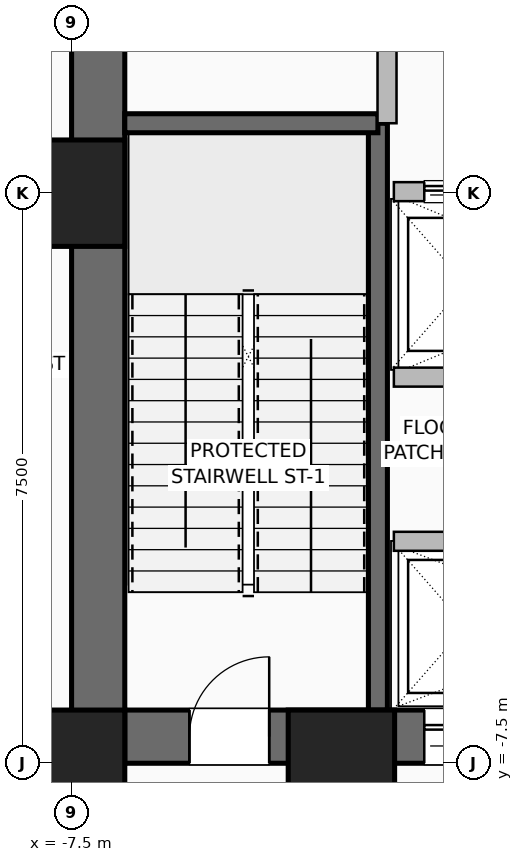
"""IFC4 building model, lengths in metres.
Left out: names, types, materials, properties, quantities, classifications, styles, units other than length and angle.
Written with IfcOpenShell. Run it as: python <this file> out.ifc"""

import sys

from ifc_helpers import new_model, si_unit, direction, frame, frame_2d, origin, origin_2d, place, context, subcontext, project, spatial, rectangle, hollow_rectangle, extrude, element, fill, save


model = new_model("IFC4")
c1 = context("Model", 3, precision=1e-05, world=origin(), true_north=direction((0.0, 1.0)))
c2 = subcontext(c1, "Body", "Model", "MODEL_VIEW")
j1 = project(units=[si_unit("LENGTHUNIT", "METRE"), si_unit("PLANEANGLEUNIT", "RADIAN")], contexts=[c1])
p1 = place(None, origin())
s1 = spatial("IfcSite", under=j1, at=p1, CompositionType="ELEMENT")
p2 = place(p1, origin())
s2 = spatial("IfcBuilding", under=s1, at=p2, CompositionType="ELEMENT")
p3 = place(p2, frame((0.0, 0.0, 16.2)))
s3 = spatial("IfcBuildingStorey", under=s2, at=p3, CompositionType="ELEMENT", Elevation=16.2)
for number, where, z_axis, x_axis in (
    (1, (-7.5, -7.5, 0.0), (0.0, 0.0, 1.0), (1.0, 0.0, 0.0)),
    (2, (-3.95, -7.5, 0.0), (0.0, 0.0, 1.0), (1.0, 0.0, 0.0)),
    (3, (-7.5, 0.0, 0.0), (0.0, 0.0, 1.0), (1.0, 0.0, 0.0)),
):
    element("IfcColumn", number, at=place(p3, frame(where, z_axis=z_axis, x_axis=x_axis)), inside=s3, PredefinedType="COLUMN", context=c2, shape_type="SweptSolid", body=[
        extrude(hollow_rectangle(XDim=1.4, YDim=1.4, WallThickness=0.06, at=origin_2d()), origin(), (0.0, 0.0, 1.0), 5.4),
    ])
p4 = place(p3, frame((-7.5, -7.15, 0.0), z_axis=(0.0, 0.0, 1.0), x_axis=(1.0, 0.0, 0.0)))
e4 = element("IfcWall", 4, at=p4, inside=s3, PredefinedType="SHEAR", context=c2, shape_type="SweptSolid", body=[
    extrude(rectangle(XDim=15.0, YDim=0.7, at=frame_2d((7.5, 0.0))), origin(), (0.0, 0.0, 1.0), 5.0),
])
p5 = place(p4, frame((1.55, 0.0, 0.0)))
e5 = element("IfcOpeningElement", 5, at=p5, cuts=e4, PredefinedType="OPENING", context=c2, shape_type="SweptSolid", body=[
    extrude(rectangle(XDim=1.05, YDim=2.08, at=frame_2d((0.525, 1.04))), frame((0.0, 0.36, 0.0), z_axis=(0.0, -1.0, 0.0), x_axis=(1.0, 0.0, 0.0)), (0.0, 0.0, 1.0), 0.72),
])
p6 = place(p4, frame((12.4, 0.0, 0.0)))
e6 = element("IfcOpeningElement", 6, at=p6, cuts=e4, PredefinedType="OPENING", context=c2, shape_type="SweptSolid", body=[
    extrude(rectangle(XDim=1.05, YDim=2.08, at=frame_2d((0.525, 1.04))), frame((0.0, 0.36, 0.0), z_axis=(0.0, -1.0, 0.0), x_axis=(1.0, 0.0, 0.0)), (0.0, 0.0, 1.0), 0.72),
])
p7 = place(p4, frame((4.64, 0.0, 0.0)))
e7 = element("IfcOpeningElement", 7, at=p7, cuts=e4, PredefinedType="OPENING", context=c2, shape_type="SweptSolid", body=[
    extrude(rectangle(XDim=1.1, YDim=2.2, at=frame_2d((0.55, 1.1))), frame((0.0, 0.36, 0.0), z_axis=(0.0, -1.0, 0.0), x_axis=(1.0, 0.0, 0.0)), (0.0, 0.0, 1.0), 0.72),
])
p8 = place(p4, frame((6.52, 0.0, 0.0)))
e8 = element("IfcOpeningElement", 8, at=p8, cuts=e4, PredefinedType="OPENING", context=c2, shape_type="SweptSolid", body=[
    extrude(rectangle(XDim=1.1, YDim=2.2, at=frame_2d((0.55, 1.1))), frame((0.0, 0.36, 0.0), z_axis=(0.0, -1.0, 0.0), x_axis=(1.0, 0.0, 0.0)), (0.0, 0.0, 1.0), 0.72),
])
p9 = place(p4, frame((8.4, 0.0, 0.0)))
e9 = element("IfcOpeningElement", 9, at=p9, cuts=e4, PredefinedType="OPENING", context=c2, shape_type="SweptSolid", body=[
    extrude(rectangle(XDim=1.1, YDim=2.2, at=frame_2d((0.55, 1.1))), frame((0.0, 0.36, 0.0), z_axis=(0.0, -1.0, 0.0), x_axis=(1.0, 0.0, 0.0)), (0.0, 0.0, 1.0), 0.72),
])
p10 = place(p3, frame((-7.15, -7.5, 0.0), z_axis=(0.0, 0.0, 1.0), x_axis=(0.0, 1.0, 0.0)))
e10 = element("IfcWall", 10, at=p10, inside=s3, PredefinedType="SHEAR", context=c2, shape_type="SweptSolid", body=[
    extrude(rectangle(XDim=15.0, YDim=0.7, at=frame_2d((7.5, 0.0))), origin(), (0.0, 0.0, 1.0), 5.0),
])
p11 = place(p10, frame((9.5, 0.0, 0.0)))
e11 = element("IfcOpeningElement", 11, at=p11, cuts=e10, PredefinedType="OPENING", context=c2, shape_type="SweptSolid", body=[
    extrude(rectangle(XDim=1.0, YDim=2.08, at=frame_2d((0.5, 1.04))), frame((0.0, 0.36, 0.0), z_axis=(0.0, -1.0, 0.0), x_axis=(1.0, 0.0, 0.0)), (0.0, 0.0, 1.0), 0.72),
])
p12 = place(p3, frame((-3.47, -6.8, 0.0), z_axis=(0.0, 0.0, 1.0), x_axis=(0.0, 1.0, 0.0)))
e12 = element("IfcWall", 12, at=p12, inside=s3, PredefinedType="SHEAR", context=c2, shape_type="SweptSolid", body=[
    extrude(rectangle(XDim=7.72, YDim=0.25, at=frame_2d((3.86, 0.0))), origin(), (0.0, 0.0, 1.0), 5.0),
])
p13 = place(p3, frame((-6.8, 0.92, 0.0), z_axis=(0.0, 0.0, 1.0), x_axis=(1.0, 0.0, 0.0)))
e13 = element("IfcWall", 13, at=p13, inside=s3, PredefinedType="SHEAR", context=c2, shape_type="SweptSolid", body=[
    extrude(rectangle(XDim=3.33, YDim=0.25, at=frame_2d((1.665, 0.0))), origin(), (0.0, 0.0, 1.0), 5.0),
])
p14 = place(p3, frame((-3.26, -4.58, 0.0), z_axis=(0.0, 0.0, 1.0), x_axis=(1.0, 0.0, 0.0)))
e14 = element("IfcWall", 14, at=p14, inside=s3, PredefinedType="SHEAR", context=c2, shape_type="SweptSolid", body=[
    extrude(rectangle(XDim=5.64, YDim=0.25, at=frame_2d((2.82, 0.0))), origin(), (0.0, 0.0, 1.0), 5.0),
])
p15 = place(p3, frame((-3.26, 0.02, 0.0), z_axis=(0.0, 0.0, 1.0), x_axis=(1.0, 0.0, 0.0)))
e15 = element("IfcWall", 15, at=p15, inside=s3, PredefinedType="SHEAR", context=c2, shape_type="SweptSolid", body=[
    extrude(rectangle(XDim=5.64, YDim=0.25, at=frame_2d((2.82, 0.0))), origin(), (0.0, 0.0, 1.0), 5.0),
])
p16 = place(p15, frame((0.4, 0.0, 0.0)))
e16 = element("IfcOpeningElement", 16, at=p16, cuts=e15, PredefinedType="OPENING", context=c2, shape_type="SweptSolid", body=[
    extrude(rectangle(XDim=1.1, YDim=2.2, at=frame_2d((0.55, 1.1))), frame((0.0, 0.135, 0.0), z_axis=(0.0, -1.0, 0.0), x_axis=(1.0, 0.0, 0.0)), (0.0, 0.0, 1.0), 0.27),
])
p17 = place(p15, frame((2.28, 0.0, 0.0)))
e17 = element("IfcOpeningElement", 17, at=p17, cuts=e15, PredefinedType="OPENING", context=c2, shape_type="SweptSolid", body=[
    extrude(rectangle(XDim=1.1, YDim=2.2, at=frame_2d((0.55, 1.1))), frame((0.0, 0.135, 0.0), z_axis=(0.0, -1.0, 0.0), x_axis=(1.0, 0.0, 0.0)), (0.0, 0.0, 1.0), 0.27),
])
p18 = place(p15, frame((4.16, 0.0, 0.0)))
e18 = element("IfcOpeningElement", 18, at=p18, cuts=e15, PredefinedType="OPENING", context=c2, shape_type="SweptSolid", body=[
    extrude(rectangle(XDim=1.1, YDim=2.2, at=frame_2d((0.55, 1.1))), frame((0.0, 0.135, 0.0), z_axis=(0.0, -1.0, 0.0), x_axis=(1.0, 0.0, 0.0)), (0.0, 0.0, 1.0), 0.27),
])
p19 = place(p3, frame((-3.26, -2.42, 0.0), z_axis=(0.0, 0.0, 1.0), x_axis=(1.0, 0.0, 0.0)))
e19 = element("IfcWall", 19, at=p19, inside=s3, PredefinedType="SHEAR", context=c2, shape_type="SweptSolid", body=[
    extrude(rectangle(XDim=5.64, YDim=0.25, at=frame_2d((2.82, 0.0))), origin(), (0.0, 0.0, 1.0), 5.0),
])
p20 = place(p3, frame((-3.35, 0.92, 0.0), z_axis=(0.0, 0.0, 1.0), x_axis=(0.0, 1.0, 0.0)))
e20 = element("IfcWall", 20, at=p20, inside=s3, PredefinedType="SHEAR", context=c2, shape_type="SweptSolid", body=[
    extrude(rectangle(XDim=3.62, YDim=0.25, at=frame_2d((1.81, 0.0))), origin(), (0.0, 0.0, 1.0), 5.0),
])
p21 = place(p20, frame((1.85, 0.0, 0.0)))
e21 = element("IfcOpeningElement", 21, at=p21, cuts=e20, PredefinedType="OPENING", context=c2, shape_type="SweptSolid", body=[
    extrude(rectangle(XDim=1.0, YDim=2.08, at=frame_2d((0.5, 1.04))), frame((0.0, 0.135, 0.0), z_axis=(0.0, -1.0, 0.0), x_axis=(1.0, 0.0, 0.0)), (0.0, 0.0, 1.0), 0.27),
])
p22 = place(p5, origin())
e22 = element("IfcDoor", 22, at=p22, inside=s3, OperationType="SINGLE_SWING_RIGHT", PredefinedType="DOOR", context=c2, shape_type="SweptSolid", body=[
    extrude(rectangle(XDim=1.05, YDim=2.08, at=frame_2d((0.525, 1.04))), frame((0.0, 0.025, 0.0), z_axis=(0.0, -1.0, 0.0), x_axis=(1.0, 0.0, 0.0)), (0.0, 0.0, 1.0), 0.05),
])
fill(e5, e22)
p23 = place(p7, origin())
e23 = element("IfcDoor", 23, at=p23, inside=s3, OperationType="DOUBLE_DOOR_SLIDING", PredefinedType="DOOR", context=c2, shape_type="SweptSolid", body=[
    extrude(rectangle(XDim=1.1, YDim=2.2, at=frame_2d((0.55, 1.1))), frame((0.0, 0.025, 0.0), z_axis=(0.0, -1.0, 0.0), x_axis=(1.0, 0.0, 0.0)), (0.0, 0.0, 1.0), 0.05),
])
fill(e7, e23)
p24 = place(p16, origin())
e24 = element("IfcDoor", 24, at=p24, inside=s3, OperationType="DOUBLE_DOOR_SLIDING", PredefinedType="DOOR", context=c2, shape_type="SweptSolid", body=[
    extrude(rectangle(XDim=1.1, YDim=2.2, at=frame_2d((0.55, 1.1))), frame((0.0, 0.025, 0.0), z_axis=(0.0, -1.0, 0.0), x_axis=(1.0, 0.0, 0.0)), (0.0, 0.0, 1.0), 0.05),
])
fill(e16, e24)
save(model, sys.argv[1])
